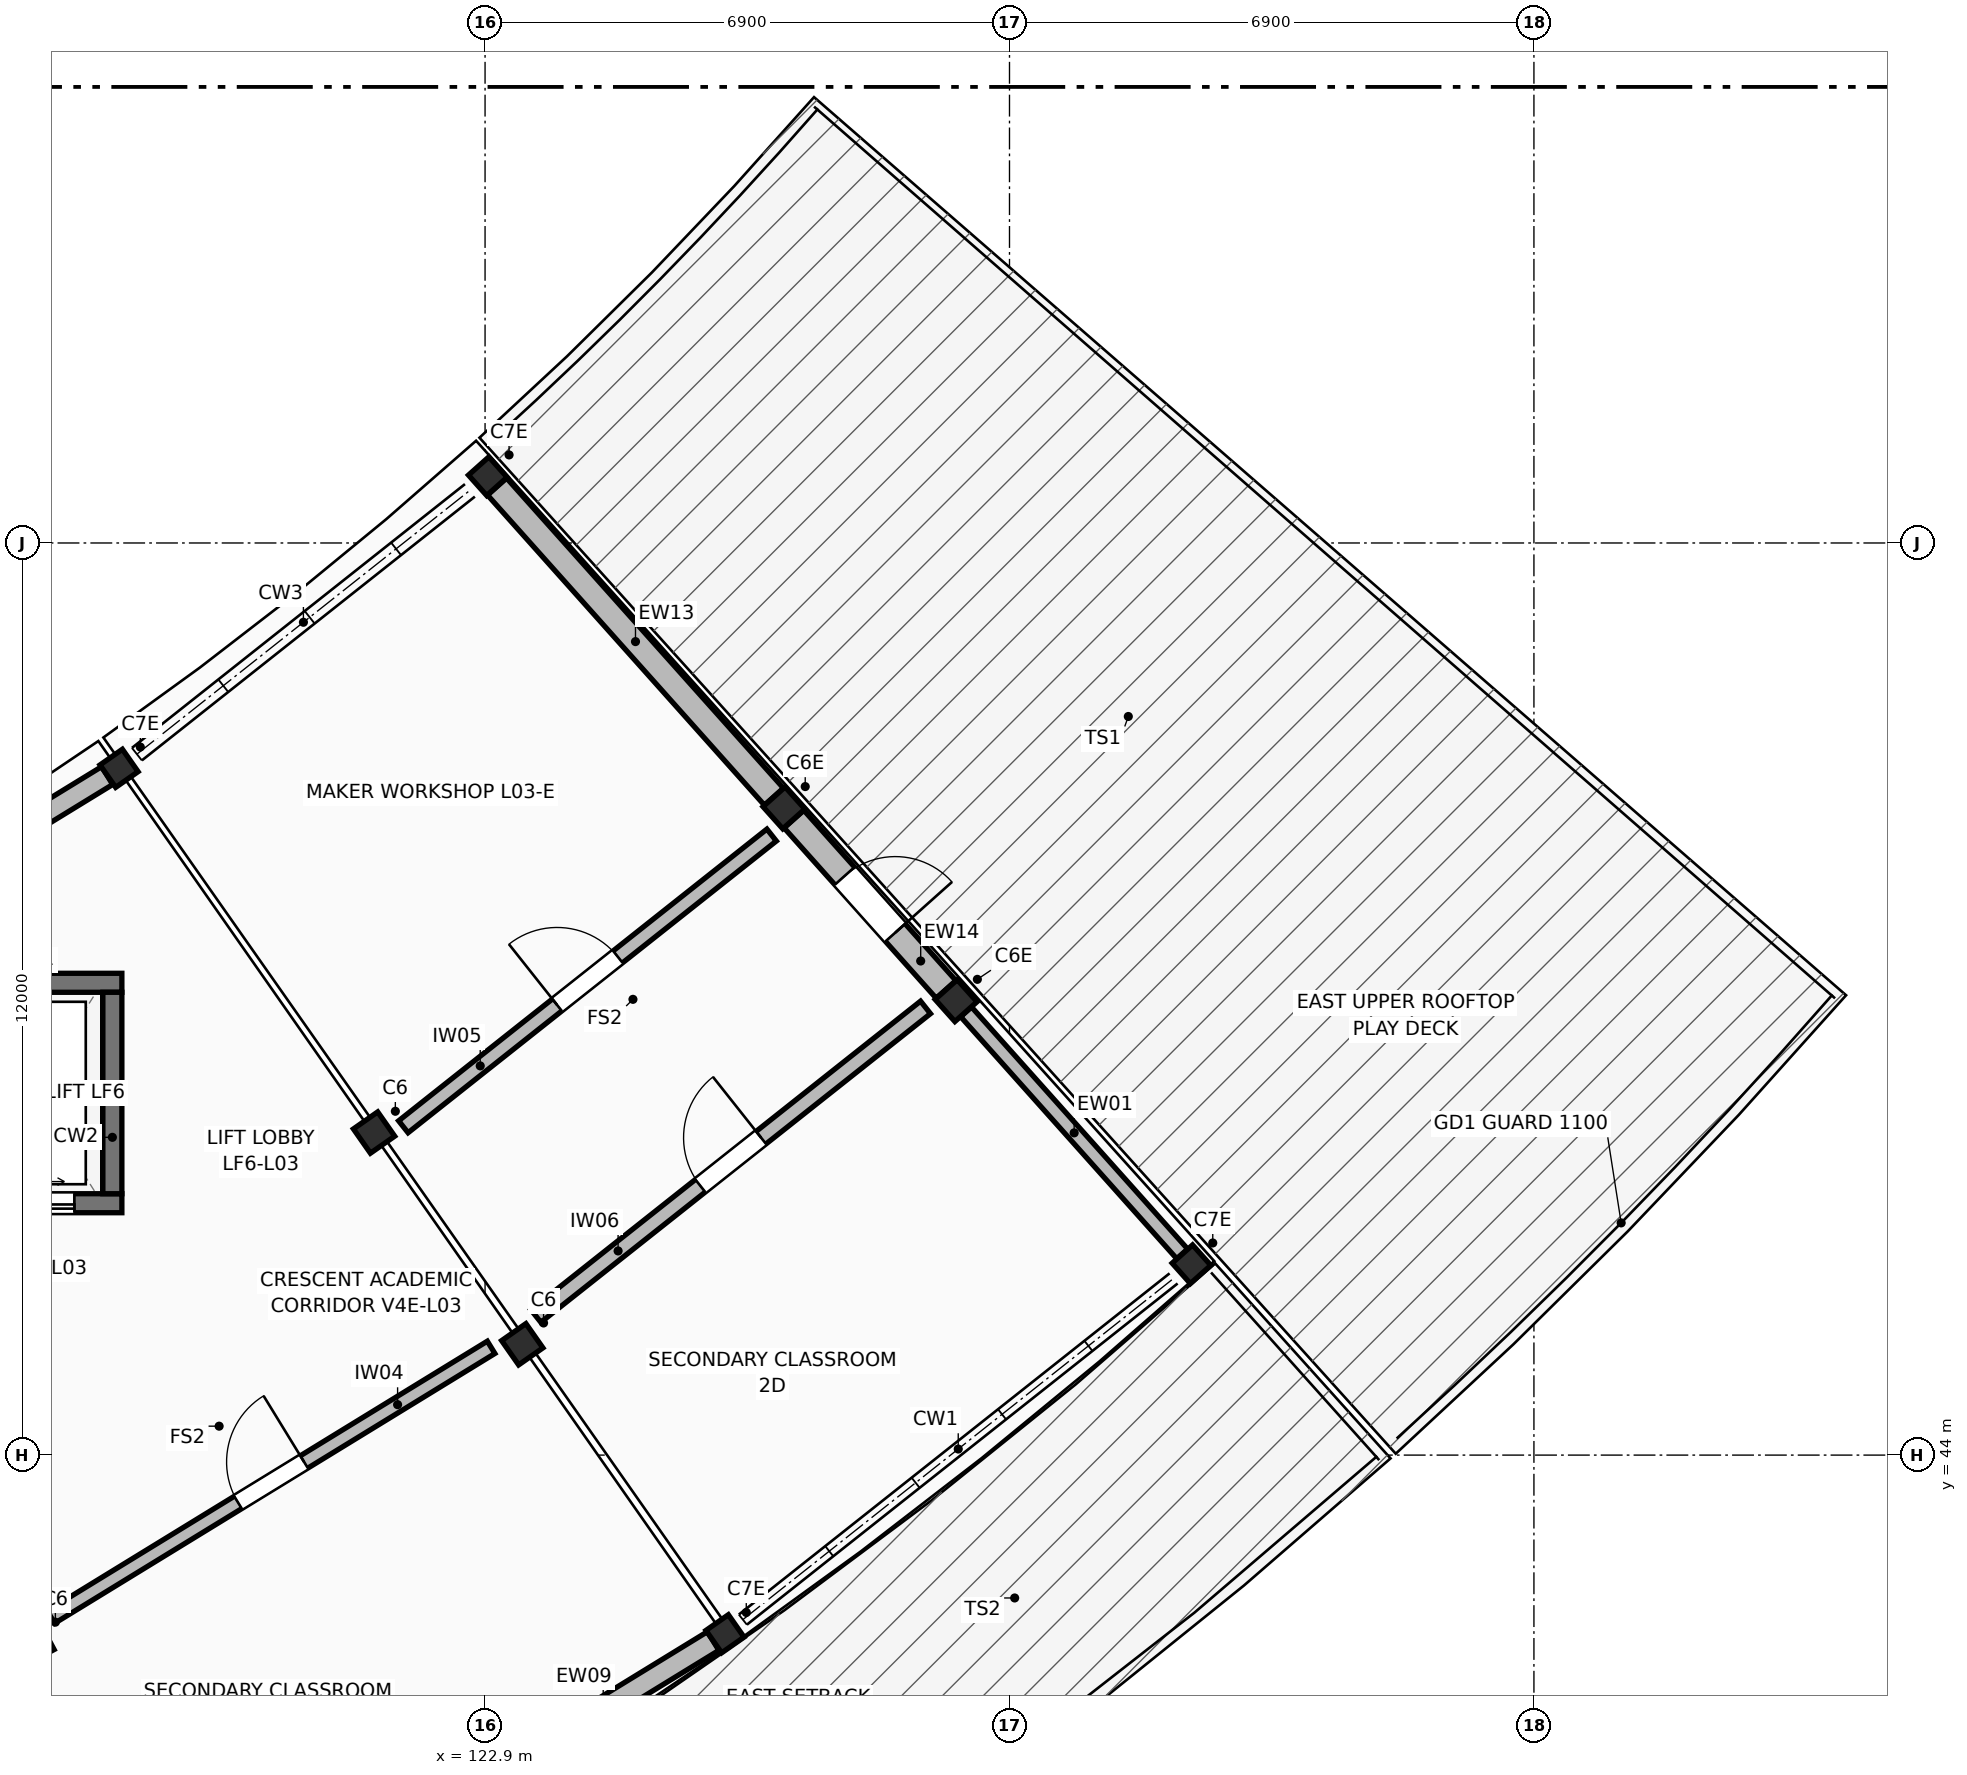
"""IFC4 building model, lengths in metres.
Left out: names, types, materials, properties, quantities, classifications, styles, units other than length and angle.
Written with IfcOpenShell. Run it as: python <this file> out.ifc"""

import sys

from ifc_helpers import new_model, si_unit, direction, frame, frame_2d, origin, origin_2d, place, context, subcontext, project, spatial, rectangle, extrude, element, fill, save


model = new_model("IFC4")
c1 = context("Model", 3, precision=1e-05, world=origin(), true_north=direction((0.0, 1.0)))
c2 = subcontext(c1, "Body", "Model", "MODEL_VIEW")
j1 = project(units=[si_unit("LENGTHUNIT", "METRE"), si_unit("PLANEANGLEUNIT", "RADIAN")], contexts=[c1])
p1 = place(None, origin())
s1 = spatial("IfcSite", under=j1, at=p1, CompositionType="ELEMENT")
p2 = place(p1, origin())
s2 = spatial("IfcBuilding", under=s1, at=p2, CompositionType="ELEMENT")
p3 = place(p2, frame((0.0, 0.0, 11.9)))
s3 = spatial("IfcBuildingStorey", under=s2, at=p3, CompositionType="ELEMENT", Elevation=11.9)
p4 = place(p3, frame((116.966, 41.522, 0.0), z_axis=(0.0, 0.0, 1.0), x_axis=(0.469471562786, -0.882947592859, 0.0)))
e1 = element("IfcColumn", 1, at=p4, inside=s3, PredefinedType="COLUMN", context=c2, shape_type="SweptSolid", body=[
    extrude(rectangle(XDim=0.39, YDim=0.39, at=origin_2d()), origin(), (0.0, 0.0, 1.0), 3.74),
])
p5 = place(p3, frame((118.084, 53.035, 0.0), z_axis=(0.0, 0.0, 1.0), x_axis=(0.573576436351, -0.819152044289, 0.0)))
e2 = element("IfcColumn", 2, at=p5, inside=s3, PredefinedType="COLUMN", context=c2, shape_type="SweptSolid", body=[
    extrude(rectangle(XDim=0.36, YDim=0.36, at=origin_2d()), origin(), (0.0, 0.0, 1.0), 3.74),
])
for number, where, z_axis, x_axis in (
    (3, (121.439, 48.243, 0.0), (0.0, 0.0, 1.0), (0.574, -0.819, 0.0)),
    (4, (123.39, 45.458, 0.0), (0.0, 0.0, 1.0), (0.574, -0.819, 0.0)),
):
    element("IfcColumn", number, at=place(p3, frame(where, z_axis=z_axis, x_axis=x_axis)), inside=s3, PredefinedType="COLUMN", context=c2, shape_type="SweptSolid", body=[
        extrude(rectangle(XDim=0.39, YDim=0.39, at=origin_2d()), origin(), (0.0, 0.0, 1.0), 3.74),
    ])
for number, where, z_axis, x_axis in (
    (5, (126.057, 41.649, 0.0), (0.0, 0.0, 1.0), (0.574, -0.819, 0.0)),
    (6, (122.936, 56.879, 0.0), (0.0, 0.0, 1.0), (0.666, -0.746, 0.0)),
):
    element("IfcColumn", number, at=place(p3, frame(where, z_axis=z_axis, x_axis=x_axis)), inside=s3, PredefinedType="COLUMN", context=c2, shape_type="SweptSolid", body=[
        extrude(rectangle(XDim=0.36, YDim=0.36, at=origin_2d()), origin(), (0.0, 0.0, 1.0), 3.74),
    ])
for number, where, z_axis, x_axis in (
    (7, (126.833, 52.515, 0.0), (0.0, 0.0, 1.0), (0.666, -0.746, 0.0)),
    (8, (129.097, 49.979, 0.0), (0.0, 0.0, 1.0), (0.666, -0.746, 0.0)),
):
    element("IfcColumn", number, at=place(p3, frame(where, z_axis=z_axis, x_axis=x_axis)), inside=s3, PredefinedType="COLUMN", context=c2, shape_type="SweptSolid", body=[
        extrude(rectangle(XDim=0.39, YDim=0.39, at=origin_2d()), origin(), (0.0, 0.0, 1.0), 3.74),
    ])
p6 = place(p3, frame((132.194, 46.511, 0.0), z_axis=(0.0, 0.0, 1.0), x_axis=(0.66614204858, -0.745824893064, 0.0)))
e9 = element("IfcColumn", 9, at=p6, inside=s3, PredefinedType="COLUMN", context=c2, shape_type="SweptSolid", body=[
    extrude(rectangle(XDim=0.36, YDim=0.36, at=origin_2d()), origin(), (0.0, 0.0, 1.0), 3.74),
])
p7 = place(p3, frame((115.771, 50.214, 0.0), z_axis=(0.0, 0.0, 1.0), x_axis=(1.0, 0.0, 0.0)))
e10 = element("IfcWall", 10, at=p7, inside=s3, PredefinedType="SHEAR", context=c2, shape_type="SweptSolid", body=[
    extrude(rectangle(XDim=2.35, YDim=0.25, at=frame_2d((1.175, 0.0))), origin(), (0.0, 0.0, 1.0), 3.51),
])
p8 = place(p3, frame((115.771, 47.314, 0.0), z_axis=(0.0, 0.0, 1.0), x_axis=(1.0, 0.0, 0.0)))
e11 = element("IfcWall", 11, at=p8, inside=s3, PredefinedType="SHEAR", context=c2, shape_type="SweptSolid", body=[
    extrude(rectangle(XDim=2.35, YDim=0.25, at=frame_2d((1.175, 0.0))), origin(), (0.0, 0.0, 1.0), 3.51),
])
p9 = place(p8, frame((0.625, 0.0, 0.0)))
e12 = element("IfcOpeningElement", 12, at=p9, cuts=e11, PredefinedType="OPENING", context=c2, shape_type="SweptSolid", body=[
    extrude(rectangle(XDim=1.1, YDim=2.15, at=frame_2d((0.55, 1.075))), frame((0.0, 0.135, 0.0), z_axis=(0.0, -1.0, 0.0), x_axis=(1.0, 0.0, 0.0)), (0.0, 0.0, 1.0), 0.27),
])
p10 = place(p3, frame((117.996, 47.439, 0.0), z_axis=(0.0, 0.0, 1.0), x_axis=(0.0, 1.0, 0.0)))
e13 = element("IfcWall", 13, at=p10, inside=s3, PredefinedType="SHEAR", context=c2, shape_type="SweptSolid", body=[
    extrude(rectangle(XDim=2.65, YDim=0.25, at=frame_2d((1.325, 0.0))), origin(), (0.0, 0.0, 1.0), 3.51),
])
p11 = place(p3, frame((112.78, 49.785, 0.0), z_axis=(0.0, 0.0, 1.0), x_axis=(0.852624496332, 0.522524131744, 0.0)))
e14 = element("IfcWall", 14, at=p11, inside=s3, PredefinedType="STANDARD", context=c2, shape_type="SweptSolid", body=[
    extrude(rectangle(XDim=6.038, YDim=0.276, at=frame_2d((3.019, 0.0))), origin(), (0.0, 0.0, 1.0), 2.8),
])
p12 = place(p11, frame((1.199, 0.0, 0.95)))
e15 = element("IfcOpeningElement", 15, at=p12, cuts=e14, PredefinedType="OPENING", context=c2, shape_type="SweptSolid", body=[
    extrude(rectangle(XDim=1.22, YDim=1.3, at=frame_2d((0.61, 0.65))), frame((0.0, 0.148, 0.0), z_axis=(0.0, -1.0, 0.0), x_axis=(1.0, 0.0, 0.0)), (0.0, 0.0, 1.0), 0.296),
])
p13 = place(p11, frame((3.619, 0.0, 0.95)))
e16 = element("IfcOpeningElement", 16, at=p13, cuts=e14, PredefinedType="OPENING", context=c2, shape_type="SweptSolid", body=[
    extrude(rectangle(XDim=1.22, YDim=1.3, at=frame_2d((0.61, 0.65))), frame((0.0, 0.148, 0.0), z_axis=(0.0, -1.0, 0.0), x_axis=(1.0, 0.0, 0.0)), (0.0, 0.0, 1.0), 0.296),
])
p14 = place(p3, frame((119.305, 37.512, 0.0), z_axis=(0.0, 0.0, 1.0), x_axis=(0.852637539072, 0.522502848763, 0.0)))
e17 = element("IfcWall", 17, at=p14, inside=s3, PredefinedType="STANDARD", context=c2, shape_type="SweptSolid", body=[
    extrude(rectangle(XDim=7.735, YDim=0.288, at=frame_2d((3.868, 0.0))), origin(), (0.0, 0.0, 1.0), 2.8),
])
p15 = place(p14, frame((3.393, 0.0, 0.0)))
e18 = element("IfcOpeningElement", 18, at=p15, cuts=e17, PredefinedType="OPENING", context=c2, shape_type="SweptSolid", body=[
    extrude(rectangle(XDim=0.95, YDim=2.15, at=frame_2d((0.475, 1.075))), frame((0.0, 0.154, 0.0), z_axis=(0.0, -1.0, 0.0), x_axis=(1.0, 0.0, 0.0)), (0.0, 0.0, 1.0), 0.308),
])
p16 = place(p3, frame((123.058, 56.742, 0.0), z_axis=(0.0, 0.0, 1.0), x_axis=(0.666068996659, -0.745890133793, 0.0)))
e19 = element("IfcWall", 19, at=p16, inside=s3, PredefinedType="STANDARD", context=c2, shape_type="SweptSolid", body=[
    extrude(rectangle(XDim=5.469, YDim=0.336, at=frame_2d((2.734, 0.0))), origin(), (0.0, 0.0, 1.0), 2.8),
])
p17 = place(p3, frame((126.964, 52.367, 0.0), z_axis=(0.0, 0.0, 1.0), x_axis=(0.666077136643, -0.745882864826, 0.0)))
e20 = element("IfcWall", 20, at=p17, inside=s3, PredefinedType="STANDARD", context=c2, shape_type="SweptSolid", body=[
    extrude(rectangle(XDim=3.004, YDim=0.348, at=frame_2d((1.502, 0.0))), origin(), (0.0, 0.0, 1.0), 2.8),
])
p18 = place(p17, frame((1.002, 0.0, 0.0)))
e21 = element("IfcOpeningElement", 21, at=p18, cuts=e20, PredefinedType="OPENING", context=c2, shape_type="SweptSolid", body=[
    extrude(rectangle(XDim=1.0, YDim=2.15, at=frame_2d((0.5, 1.075))), frame((0.0, 0.184, 0.0), z_axis=(0.0, -1.0, 0.0), x_axis=(1.0, 0.0, 0.0)), (0.0, 0.0, 1.0), 0.368),
])
p19 = place(p3, frame((129.229, 49.832, 0.0), z_axis=(0.0, 0.0, 1.0), x_axis=(0.666062362194, -0.74589605822, 0.0)))
e22 = element("IfcWall", 22, at=p19, inside=s3, PredefinedType="STANDARD", context=c2, shape_type="SweptSolid", body=[
    extrude(rectangle(XDim=4.269, YDim=0.192, at=frame_2d((2.135, 0.0))), origin(), (0.0, 0.0, 1.0), 2.8),
])
p20 = place(p3, frame((117.189, 41.869, 0.0), z_axis=(0.0, 0.0, 1.0), x_axis=(0.852640514979, 0.522497992547, 0.0)))
e23 = element("IfcWall", 23, at=p20, inside=s3, PredefinedType="STANDARD", context=c2, shape_type="SweptSolid", body=[
    extrude(rectangle(XDim=6.792, YDim=0.19, at=frame_2d((3.396, 0.0))), origin(), (0.0, 0.0, 1.0), 2.75),
])
p21 = place(p20, frame((2.886, 0.0, 0.0)))
e24 = element("IfcOpeningElement", 24, at=p21, cuts=e23, PredefinedType="OPENING", context=c2, shape_type="SweptSolid", body=[
    extrude(rectangle(XDim=1.02, YDim=2.12, at=frame_2d((0.51, 1.06))), frame((0.0, 0.105, 0.0), z_axis=(0.0, -1.0, 0.0), x_axis=(1.0, 0.0, 0.0)), (0.0, 0.0, 1.0), 0.21),
])
p22 = place(p3, frame((121.825, 48.32, 0.0), z_axis=(0.0, 0.0, 1.0), x_axis=(0.783880806515, 0.620911331171, 0.0)))
e25 = element("IfcWall", 25, at=p22, inside=s3, PredefinedType="STANDARD", context=c2, shape_type="SweptSolid", body=[
    extrude(rectangle(XDim=6.181, YDim=0.2, at=frame_2d((3.091, 0.0))), origin(), (0.0, 0.0, 1.0), 2.75),
])
p23 = place(p22, frame((2.581, 0.0, 0.0)))
e26 = element("IfcOpeningElement", 26, at=p23, cuts=e25, PredefinedType="OPENING", context=c2, shape_type="SweptSolid", body=[
    extrude(rectangle(XDim=1.02, YDim=2.18, at=frame_2d((0.51, 1.09))), frame((0.0, 0.11, 0.0), z_axis=(0.0, -1.0, 0.0), x_axis=(1.0, 0.0, 0.0)), (0.0, 0.0, 1.0), 0.22),
])
p24 = place(p3, frame((123.569, 45.829, 0.0), z_axis=(0.0, 0.0, 1.0), x_axis=(0.783889859425, 0.620899901989, 0.0)))
e27 = element("IfcWall", 27, at=p24, inside=s3, PredefinedType="STANDARD", context=c2, shape_type="SweptSolid", body=[
    extrude(rectangle(XDim=6.54, YDim=0.21, at=frame_2d((3.27, 0.0))), origin(), (0.0, 0.0, 1.0), 2.75),
])
p25 = place(p24, frame((2.76, 0.0, 0.0)))
e28 = element("IfcOpeningElement", 28, at=p25, cuts=e27, PredefinedType="OPENING", context=c2, shape_type="SweptSolid", body=[
    extrude(rectangle(XDim=1.02, YDim=2.24, at=frame_2d((0.51, 1.12))), frame((0.0, 0.115, 0.0), z_axis=(0.0, -1.0, 0.0), x_axis=(1.0, 0.0, 0.0)), (0.0, 0.0, 1.0), 0.23),
])
p26 = place(p18, origin())
e29 = element("IfcDoor", 29, at=p26, inside=s3, OperationType="SINGLE_SWING_RIGHT", PredefinedType="DOOR", context=c2, shape_type="SweptSolid", body=[
    extrude(rectangle(XDim=1.0, YDim=2.15, at=frame_2d((0.5, 1.075))), frame((0.0, 0.025, 0.0), z_axis=(0.0, -1.0, 0.0), x_axis=(1.0, 0.0, 0.0)), (0.0, 0.0, 1.0), 0.05),
])
fill(e21, e29)
p27 = place(p9, origin())
e30 = element("IfcDoor", 30, at=p27, inside=s3, OperationType="DOUBLE_DOOR_SLIDING", PredefinedType="DOOR", context=c2, shape_type="SweptSolid", body=[
    extrude(rectangle(XDim=1.1, YDim=2.15, at=frame_2d((0.55, 1.075))), frame((0.0, 0.025, 0.0), z_axis=(0.0, -1.0, 0.0), x_axis=(1.0, 0.0, 0.0)), (0.0, 0.0, 1.0), 0.05),
])
fill(e12, e30)
p28 = place(p21, origin())
e31 = element("IfcDoor", 31, at=p28, inside=s3, OperationType="SINGLE_SWING_RIGHT", PredefinedType="DOOR", context=c2, shape_type="SweptSolid", body=[
    extrude(rectangle(XDim=1.02, YDim=2.12, at=frame_2d((0.51, 1.06))), frame((0.0, 0.025, 0.0), z_axis=(0.0, -1.0, 0.0), x_axis=(1.0, 0.0, 0.0)), (0.0, 0.0, 1.0), 0.05),
])
fill(e24, e31)
p29 = place(p23, frame((1.02, 0.0, 0.0), z_axis=(0.0, 0.0, 1.0), x_axis=(-1.0, 0.0, 0.0)))
e32 = element("IfcDoor", 32, at=p29, inside=s3, OperationType="SINGLE_SWING_LEFT", PredefinedType="DOOR", context=c2, shape_type="SweptSolid", body=[
    extrude(rectangle(XDim=1.02, YDim=2.18, at=frame_2d((0.51, 1.09))), frame((0.0, 0.025, 0.0), z_axis=(0.0, -1.0, 0.0), x_axis=(1.0, 0.0, 0.0)), (0.0, 0.0, 1.0), 0.05),
])
fill(e26, e32)
p30 = place(p25, origin())
e33 = element("IfcDoor", 33, at=p30, inside=s3, OperationType="SINGLE_SWING_RIGHT", PredefinedType="DOOR", context=c2, shape_type="SweptSolid", body=[
    extrude(rectangle(XDim=1.02, YDim=2.24, at=frame_2d((0.51, 1.12))), frame((0.0, 0.025, 0.0), z_axis=(0.0, -1.0, 0.0), x_axis=(1.0, 0.0, 0.0)), (0.0, 0.0, 1.0), 0.05),
])
fill(e28, e33)
save(model, sys.argv[1])
